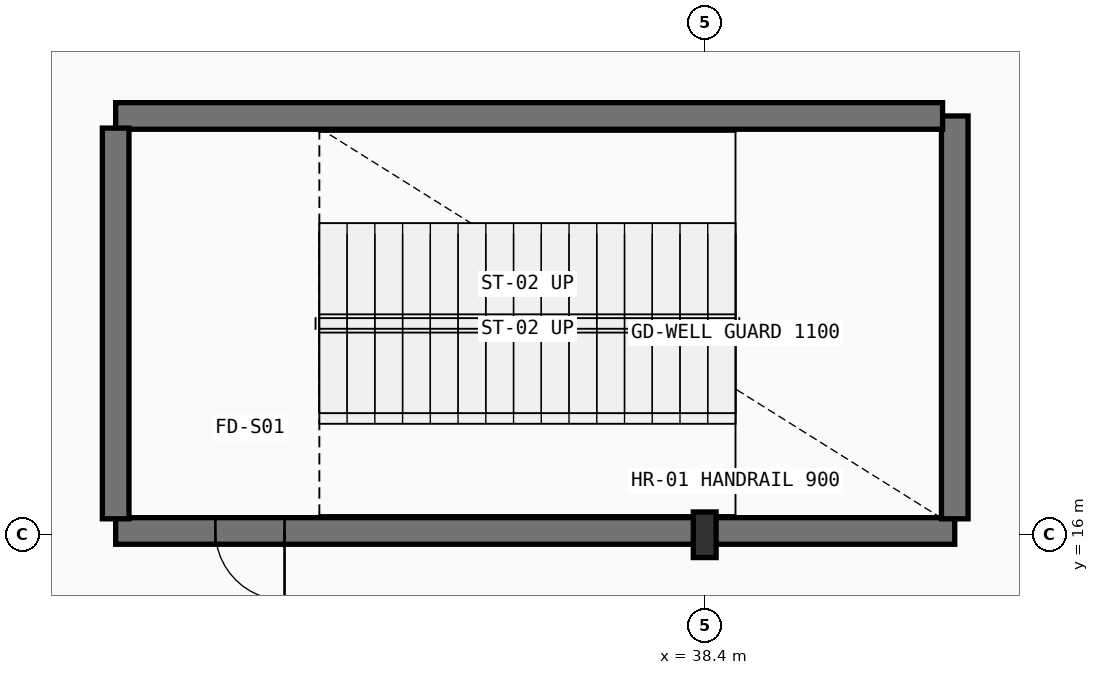
"""IFC4 building model, lengths in metres.
Left out: names, types, materials, properties, quantities, classifications, styles, units other than length and angle.
Written with IfcOpenShell. Run it as: python <this file> out.ifc"""

import sys

from ifc_helpers import new_model, si_unit, direction, frame, frame_2d, origin, origin_2d, place, context, subcontext, project, spatial, rectangle, i_section, extrude, element, fill, save


model = new_model("IFC4")
c1 = context("Model", 3, precision=1e-05, world=origin(), true_north=direction((0.0, 1.0)))
c2 = subcontext(c1, "Body", "Model", "MODEL_VIEW")
j1 = project(units=[si_unit("LENGTHUNIT", "METRE"), si_unit("PLANEANGLEUNIT", "RADIAN")], contexts=[c1])
p1 = place(None, origin())
s1 = spatial("IfcSite", under=j1, at=p1, CompositionType="ELEMENT")
p2 = place(p1, origin())
s2 = spatial("IfcBuilding", under=s1, at=p2, CompositionType="ELEMENT")
p3 = place(p2, origin())
s3 = spatial("IfcBuildingStorey", under=s2, at=p3, CompositionType="ELEMENT", Elevation=0.0)
p4 = place(p3, frame((38.4, 16.0, 0.0), z_axis=(0.0, 0.0, 1.0), x_axis=(1.0, 0.0, 0.0)))
e1 = element("IfcColumn", 1, at=p4, inside=s3, PredefinedType="COLUMN", context=c2, shape_type="SweptSolid", body=[
    extrude(i_section(OverallWidth=0.3, OverallDepth=0.6, WebThickness=0.015, FlangeThickness=0.03, FilletRadius=0.027, at=origin_2d()), origin(), (0.0, 0.0, 1.0), 6.0),
])
p5 = place(p3, frame((41.69, 16.05, 0.0), z_axis=(0.0, 0.0, 1.0), x_axis=(-1.0, 0.0, 0.0)))
e2 = element("IfcWall", 2, at=p5, inside=s3, PredefinedType="SHEAR", context=c2, shape_type="SweptSolid", body=[
    extrude(rectangle(XDim=11.04, YDim=0.35, at=frame_2d((5.52, 0.0))), origin(), (0.0, 0.0, 1.0), 5.77),
])
p6 = place(p5, frame((8.818, 0.0, 0.0)))
e3 = element("IfcOpeningElement", 3, at=p6, cuts=e2, PredefinedType="OPENING", context=c2, shape_type="SweptSolid", body=[
    extrude(rectangle(XDim=0.91, YDim=2.08, at=frame_2d((0.455, 1.04))), frame((0.0, 0.185, 0.0), z_axis=(0.0, -1.0, 0.0), x_axis=(1.0, 0.0, 0.0)), (0.0, 0.0, 1.0), 0.37),
])
p7 = place(p3, frame((41.69, 21.51, 0.0), z_axis=(0.0, 0.0, 1.0), x_axis=(0.0, -1.0, 0.0)))
e4 = element("IfcWall", 4, at=p7, inside=s3, PredefinedType="SHEAR", context=c2, shape_type="SweptSolid", body=[
    extrude(rectangle(XDim=5.3, YDim=0.35, at=frame_2d((2.65, 0.0))), origin(), (0.0, 0.0, 1.0), 5.77),
])
p8 = place(p3, frame((30.65, 21.51, 0.0), z_axis=(0.0, 0.0, 1.0), x_axis=(1.0, 0.0, 0.0)))
e5 = element("IfcWall", 5, at=p8, inside=s3, PredefinedType="SHEAR", context=c2, shape_type="SweptSolid", body=[
    extrude(rectangle(XDim=10.88, YDim=0.35, at=frame_2d((5.44, 0.0))), origin(), (0.0, 0.0, 1.0), 5.77),
])
p9 = place(p3, frame((30.65, 16.21, 0.0), z_axis=(0.0, 0.0, 1.0), x_axis=(0.0, 1.0, 0.0)))
e6 = element("IfcWall", 6, at=p9, inside=s3, PredefinedType="SHEAR", context=c2, shape_type="SweptSolid", body=[
    extrude(rectangle(XDim=5.14, YDim=0.35, at=frame_2d((2.57, 0.0))), origin(), (0.0, 0.0, 1.0), 5.77),
])
p10 = place(p6, origin())
e7 = element("IfcDoor", 7, at=p10, inside=s3, OperationType="SINGLE_SWING_LEFT", PredefinedType="DOOR", context=c2, shape_type="SweptSolid", body=[
    extrude(rectangle(XDim=0.91, YDim=2.08, at=frame_2d((0.455, 1.04))), frame((0.0, 0.025, 0.0), z_axis=(0.0, -1.0, 0.0), x_axis=(1.0, 0.0, 0.0)), (0.0, 0.0, 1.0), 0.05),
])
fill(e3, e7)
save(model, sys.argv[1])
